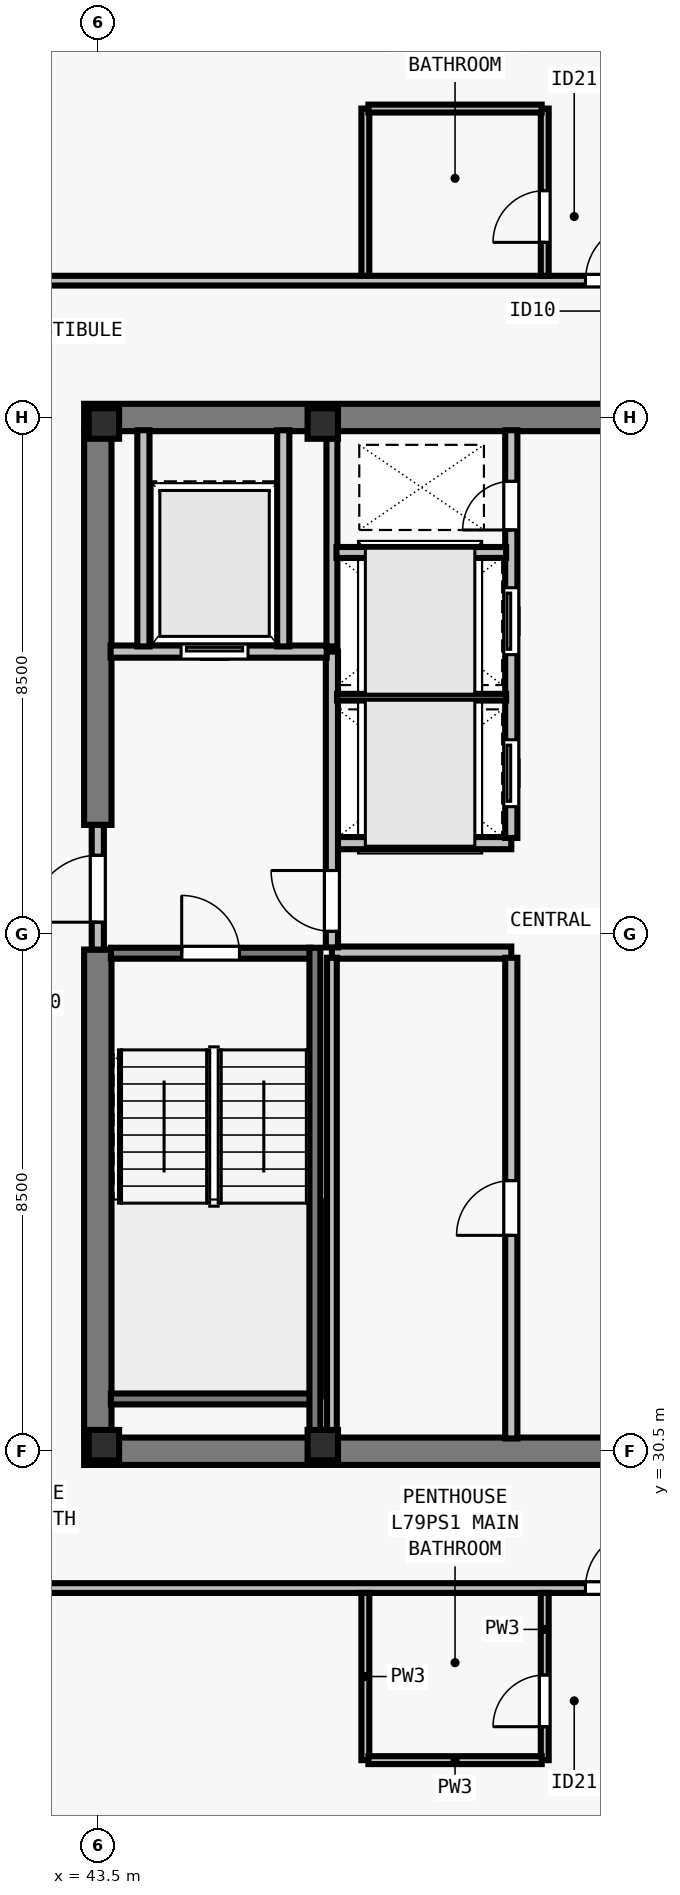
"""IFC4 building model, lengths in metres.
Left out: names, types, materials, properties, quantities, classifications, styles, units other than length and angle.
Written with IfcOpenShell. Run it as: python <this file> out.ifc"""

import sys

from ifc_helpers import new_model, si_unit, direction, frame, frame_2d, origin, origin_2d, place, context, subcontext, project, spatial, rectangle, i_section, extrude, element, fill, save


model = new_model("IFC4")
c1 = context("Model", 3, precision=1e-05, world=origin(), true_north=direction((0.0, 1.0)))
c2 = subcontext(c1, "Body", "Model", "MODEL_VIEW")
j1 = project(units=[si_unit("LENGTHUNIT", "METRE"), si_unit("PLANEANGLEUNIT", "RADIAN")], contexts=[c1])
p1 = place(None, origin())
s1 = spatial("IfcSite", under=j1, at=p1, CompositionType="ELEMENT")
p2 = place(p1, origin())
s2 = spatial("IfcBuilding", under=s1, at=p2, CompositionType="ELEMENT")
p3 = place(p2, frame((0.0, 0.0, 287.5)))
s3 = spatial("IfcBuildingStorey", under=s2, at=p3, CompositionType="ELEMENT", Elevation=287.5)
for number, where, z_axis, x_axis in (
    (1, (43.6, 30.6, 0.0), (0.0, 0.0, 1.0), (1.0, 0.0, 0.0)),
    (2, (47.2, 30.6, 0.0), (0.0, 0.0, 1.0), (1.0, 0.0, 0.0)),
    (3, (43.6, 47.4, 0.0), (0.0, 0.0, 1.0), (1.0, 0.0, 0.0)),
    (4, (47.2, 47.4, 0.0), (0.0, 0.0, 1.0), (1.0, 0.0, 0.0)),
):
    element("IfcColumn", number, at=place(p3, frame(where, z_axis=z_axis, x_axis=x_axis)), inside=s3, PredefinedType="COLUMN", context=c2, shape_type="SweptSolid", body=[
        extrude(i_section(OverallWidth=0.5, OverallDepth=0.5, WebThickness=0.028, FlangeThickness=0.045, at=origin_2d()), origin(), (0.0, 0.0, 1.0), 3.5),
    ])
for number, where, z_axis, x_axis in (
    (5, (43.275, 30.5, 0.0), (0.0, 0.0, 1.0), (1.0, 0.0, 0.0)),
    (6, (43.275, 47.5, 0.0), (0.0, 0.0, 1.0), (1.0, 0.0, 0.0)),
):
    element("IfcWall", number, at=place(p3, frame(where, z_axis=z_axis, x_axis=x_axis)), inside=s3, PredefinedType="SHEAR", context=c2, shape_type="SweptSolid", body=[
        extrude(rectangle(XDim=17.45, YDim=0.45, at=frame_2d((8.725, 0.0))), origin(), (0.0, 0.0, 1.0), 3.29),
    ])
p4 = place(p3, frame((43.5, 30.715, 0.0), z_axis=(0.0, 0.0, 1.0), x_axis=(0.0, 1.0, 0.0)))
e7 = element("IfcWall", 7, at=p4, inside=s3, PredefinedType="SHEAR", context=c2, shape_type="SweptSolid", body=[
    extrude(rectangle(XDim=8.035, YDim=0.45, at=frame_2d((4.018, 0.0))), origin(), (0.0, 0.0, 1.0), 3.29),
])
p5 = place(p3, frame((43.5, 40.8, 0.0), z_axis=(0.0, 0.0, 1.0), x_axis=(0.0, 1.0, 0.0)))
e8 = element("IfcWall", 8, at=p5, inside=s3, PredefinedType="SHEAR", context=c2, shape_type="SweptSolid", body=[
    extrude(rectangle(XDim=6.485, YDim=0.45, at=frame_2d((3.242, 0.0))), origin(), (0.0, 0.0, 1.0), 3.29),
])
for number, where, z_axis, x_axis in (
    (9, (47.35, 38.7, 0.0), (0.0, 0.0, 1.0), (1.0, 0.0, 0.0)),
    (10, (47.35, 40.5, 0.0), (0.0, 0.0, 1.0), (1.0, 0.0, 0.0)),
):
    element("IfcWall", number, at=place(p3, frame(where, z_axis=z_axis, x_axis=x_axis)), inside=s3, PredefinedType="SOLIDWALL", context=c2, shape_type="SweptSolid", body=[
        extrude(rectangle(XDim=2.95, YDim=0.2, at=frame_2d((1.475, 0.0))), origin(), (0.0, 0.0, 1.0), 3.29),
    ])
p6 = place(p3, frame((50.3, 30.71, 0.0), z_axis=(0.0, 0.0, 1.0), x_axis=(0.0, 1.0, 0.0)))
e11 = element("IfcWall", 11, at=p6, inside=s3, PredefinedType="SOLIDWALL", context=c2, shape_type="SweptSolid", body=[
    extrude(rectangle(XDim=7.905, YDim=0.2, at=frame_2d((3.953, 0.0))), origin(), (0.0, 0.0, 1.0), 3.29),
])
p7 = place(p6, frame((3.34, 0.0, 0.0)))
e12 = element("IfcOpeningElement", 12, at=p7, cuts=e11, PredefinedType="OPENING", context=c2, shape_type="SweptSolid", body=[
    extrude(rectangle(XDim=0.9, YDim=2.12, at=frame_2d((0.45, 1.06))), frame((0.0, 0.11, 0.0), z_axis=(0.0, -1.0, 0.0), x_axis=(1.0, 0.0, 0.0)), (0.0, 0.0, 1.0), 0.22),
])
p8 = place(p3, frame((50.3, 40.585, 0.0), z_axis=(0.0, 0.0, 1.0), x_axis=(0.0, 1.0, 0.0)))
e13 = element("IfcWall", 13, at=p8, inside=s3, PredefinedType="SOLIDWALL", context=c2, shape_type="SweptSolid", body=[
    extrude(rectangle(XDim=6.705, YDim=0.2, at=frame_2d((3.353, 0.0))), origin(), (0.0, 0.0, 1.0), 3.29),
])
p9 = place(p8, frame((0.515, 0.0, 0.0)))
e14 = element("IfcOpeningElement", 14, at=p9, cuts=e13, PredefinedType="OPENING", context=c2, shape_type="SweptSolid", body=[
    extrude(rectangle(XDim=1.1, YDim=2.2, at=frame_2d((0.55, 1.1))), frame((0.0, 0.11, 0.0), z_axis=(0.0, -1.0, 0.0), x_axis=(1.0, 0.0, 0.0)), (0.0, 0.0, 1.0), 0.22),
])
p10 = place(p8, frame((3.015, 0.0, 0.0)))
e15 = element("IfcOpeningElement", 15, at=p10, cuts=e13, PredefinedType="OPENING", context=c2, shape_type="SweptSolid", body=[
    extrude(rectangle(XDim=1.1, YDim=2.2, at=frame_2d((0.55, 1.1))), frame((0.0, 0.11, 0.0), z_axis=(0.0, -1.0, 0.0), x_axis=(1.0, 0.0, 0.0)), (0.0, 0.0, 1.0), 0.22),
])
p11 = place(p8, frame((5.065, 0.0, 0.0)))
e16 = element("IfcOpeningElement", 16, at=p11, cuts=e13, PredefinedType="OPENING", context=c2, shape_type="SweptSolid", body=[
    extrude(rectangle(XDim=0.8, YDim=2.08, at=frame_2d((0.4, 1.04))), frame((0.0, 0.11, 0.0), z_axis=(0.0, -1.0, 0.0), x_axis=(1.0, 0.0, 0.0)), (0.0, 0.0, 1.0), 0.22),
])
p12 = place(p3, frame((43.5, 38.75, 0.0), z_axis=(0.0, 0.0, 1.0), x_axis=(0.0, 1.0, 0.0)))
e17 = element("IfcWall", 17, at=p12, inside=s3, PredefinedType="SOLIDWALL", context=c2, shape_type="SweptSolid", body=[
    extrude(rectangle(XDim=2.05, YDim=0.2, at=frame_2d((1.025, 0.0))), origin(), (0.0, 0.0, 1.0), 3.29),
])
p13 = place(p12, frame((0.45, 0.0, 0.0)))
e18 = element("IfcOpeningElement", 18, at=p13, cuts=e17, PredefinedType="OPENING", context=c2, shape_type="SweptSolid", body=[
    extrude(rectangle(XDim=1.1, YDim=2.15, at=frame_2d((0.55, 1.075))), frame((0.0, 0.11, 0.0), z_axis=(0.0, -1.0, 0.0), x_axis=(1.0, 0.0, 0.0)), (0.0, 0.0, 1.0), 0.22),
])
p14 = place(p3, frame((47.35, 38.785, 0.0), z_axis=(0.0, 0.0, 1.0), x_axis=(0.0, 1.0, 0.0)))
e19 = element("IfcWall", 19, at=p14, inside=s3, PredefinedType="SOLIDWALL", context=c2, shape_type="SweptSolid", body=[
    extrude(rectangle(XDim=4.865, YDim=0.2, at=frame_2d((2.433, 0.0))), origin(), (0.0, 0.0, 1.0), 3.29),
])
p15 = place(p14, frame((0.265, 0.0, 0.0)))
e20 = element("IfcOpeningElement", 20, at=p15, cuts=e19, PredefinedType="OPENING", context=c2, shape_type="SweptSolid", body=[
    extrude(rectangle(XDim=1.0, YDim=2.15, at=frame_2d((0.5, 1.075))), frame((0.0, 0.11, 0.0), z_axis=(0.0, -1.0, 0.0), x_axis=(1.0, 0.0, 0.0)), (0.0, 0.0, 1.0), 0.22),
])
p16 = place(p3, frame((43.71, 43.65, 0.0), z_axis=(0.0, 0.0, 1.0), x_axis=(1.0, 0.0, 0.0)))
e21 = element("IfcWall", 21, at=p16, inside=s3, PredefinedType="SOLIDWALL", context=c2, shape_type="SweptSolid", body=[
    extrude(rectangle(XDim=3.555, YDim=0.2, at=frame_2d((1.777, 0.0))), origin(), (0.0, 0.0, 1.0), 3.29),
])
p17 = place(p16, frame((1.16, 0.0, 0.0)))
e22 = element("IfcOpeningElement", 22, at=p17, cuts=e21, PredefinedType="OPENING", context=c2, shape_type="SweptSolid", body=[
    extrude(rectangle(XDim=1.1, YDim=2.2, at=frame_2d((0.55, 1.1))), frame((0.0, 0.11, 0.0), z_axis=(0.0, -1.0, 0.0), x_axis=(1.0, 0.0, 0.0)), (0.0, 0.0, 1.0), 0.22),
])
for number, where, z_axis, x_axis in (
    (23, (46.55, 43.735, 0.0), (0.0, 0.0, 1.0), (0.0, 1.0, 0.0)),
    (24, (44.25, 43.735, 0.0), (0.0, 0.0, 1.0), (0.0, 1.0, 0.0)),
):
    element("IfcWall", number, at=place(p3, frame(where, z_axis=z_axis, x_axis=x_axis)), inside=s3, PredefinedType="SOLIDWALL", context=c2, shape_type="SweptSolid", body=[
        extrude(rectangle(XDim=3.555, YDim=0.2, at=frame_2d((1.777, 0.0))), origin(), (0.0, 0.0, 1.0), 3.29),
    ])
p18 = place(p3, frame((47.35, 30.71, 0.0), z_axis=(0.0, 0.0, 1.0), x_axis=(0.0, 1.0, 0.0)))
e25 = element("IfcWall", 25, at=p18, inside=s3, PredefinedType="PARTITIONING", context=c2, shape_type="SweptSolid", body=[
    extrude(rectangle(XDim=7.905, YDim=0.16, at=frame_2d((3.953, 0.0))), origin(), (0.0, 0.0, 1.0), 3.29),
])
p19 = place(p3, frame((47.35, 43.735, 0.0), z_axis=(0.0, 0.0, 1.0), x_axis=(0.0, 1.0, 0.0)))
e26 = element("IfcWall", 26, at=p19, inside=s3, PredefinedType="SOLIDWALL", context=c2, shape_type="SweptSolid", body=[
    extrude(rectangle(XDim=3.555, YDim=0.18, at=frame_2d((1.777, 0.0))), origin(), (0.0, 0.0, 1.0), 3.29),
])
p20 = place(p3, frame((47.435, 42.9, 0.0), z_axis=(0.0, 0.0, 1.0), x_axis=(1.0, 0.0, 0.0)))
e27 = element("IfcWall", 27, at=p20, inside=s3, PredefinedType="PARTITIONING", context=c2, shape_type="SweptSolid", body=[
    extrude(rectangle(XDim=2.78, YDim=0.11, at=frame_2d((1.39, 0.0))), origin(), (0.0, 0.0, 1.0), 3.29),
])
p21 = place(p3, frame((47.425, 45.28, 0.0), z_axis=(0.0, 0.0, 1.0), x_axis=(1.0, 0.0, 0.0)))
e28 = element("IfcWall", 28, at=p21, inside=s3, PredefinedType="SOLIDWALL", context=c2, shape_type="SweptSolid", body=[
    extrude(rectangle(XDim=2.79, YDim=0.18, at=frame_2d((1.395, 0.0))), origin(), (0.0, 0.0, 1.0), 3.29),
])
p22 = place(p3, frame((31.285, 28.25, 0.0), z_axis=(0.0, 0.0, 1.0), x_axis=(1.0, 0.0, 0.0)))
e29 = element("IfcWall", 29, at=p22, inside=s3, PredefinedType="PARTITIONING", context=c2, shape_type="SweptSolid", body=[
    extrude(rectangle(XDim=41.43, YDim=0.16, at=frame_2d((20.715, 0.0))), origin(), (0.0, 0.0, 1.0), 3.009),
])
p23 = place(p22, frame((20.235, 0.0, 0.0)))
e30 = element("IfcOpeningElement", 30, at=p23, cuts=e29, PredefinedType="OPENING", context=c2, shape_type="SweptSolid", body=[
    extrude(rectangle(XDim=0.96, YDim=2.18, at=frame_2d((0.48, 1.09))), frame((0.0, 0.09, 0.0), z_axis=(0.0, -1.0, 0.0), x_axis=(1.0, 0.0, 0.0)), (0.0, 0.0, 1.0), 0.18),
])
p24 = place(p3, frame((31.285, 49.75, 0.0), z_axis=(0.0, 0.0, 1.0), x_axis=(1.0, 0.0, 0.0)))
e31 = element("IfcWall", 31, at=p24, inside=s3, PredefinedType="PARTITIONING", context=c2, shape_type="SweptSolid", body=[
    extrude(rectangle(XDim=41.43, YDim=0.16, at=frame_2d((20.715, 0.0))), origin(), (0.0, 0.0, 1.0), 3.009),
])
p25 = place(p24, frame((20.235, 0.0, 0.0)))
e32 = element("IfcOpeningElement", 32, at=p25, cuts=e31, PredefinedType="OPENING", context=c2, shape_type="SweptSolid", body=[
    extrude(rectangle(XDim=0.96, YDim=2.18, at=frame_2d((0.48, 1.09))), frame((0.0, 0.09, 0.0), z_axis=(0.0, -1.0, 0.0), x_axis=(1.0, 0.0, 0.0)), (0.0, 0.0, 1.0), 0.18),
])
p26 = place(p3, frame((47.9, 25.42, 0.0), z_axis=(0.0, 0.0, 1.0), x_axis=(0.0, 1.0, 0.0)))
e33 = element("IfcWall", 33, at=p26, inside=s3, PredefinedType="PLUMBINGWALL", context=c2, shape_type="SweptSolid", body=[
    extrude(rectangle(XDim=2.75, YDim=0.13, at=frame_2d((1.375, 0.0))), origin(), (0.0, 0.0, 1.0), 3.29),
])
p27 = place(p3, frame((50.85, 25.42, 0.0), z_axis=(0.0, 0.0, 1.0), x_axis=(0.0, 1.0, 0.0)))
e34 = element("IfcWall", 34, at=p27, inside=s3, PredefinedType="PLUMBINGWALL", context=c2, shape_type="SweptSolid", body=[
    extrude(rectangle(XDim=2.75, YDim=0.13, at=frame_2d((1.375, 0.0))), origin(), (0.0, 0.0, 1.0), 3.29),
])
p28 = place(p27, frame((0.55, 0.0, 0.0)))
e35 = element("IfcOpeningElement", 35, at=p28, cuts=e34, PredefinedType="OPENING", context=c2, shape_type="SweptSolid", body=[
    extrude(rectangle(XDim=0.85, YDim=2.08, at=frame_2d((0.425, 1.04))), frame((0.0, 0.075, 0.0), z_axis=(0.0, -1.0, 0.0), x_axis=(1.0, 0.0, 0.0)), (0.0, 0.0, 1.0), 0.15),
])
p29 = place(p3, frame((47.95, 25.42, 0.0), z_axis=(0.0, 0.0, 1.0), x_axis=(1.0, 0.0, 0.0)))
e36 = element("IfcWall", 36, at=p29, inside=s3, PredefinedType="PLUMBINGWALL", context=c2, shape_type="SweptSolid", body=[
    extrude(rectangle(XDim=2.85, YDim=0.13, at=frame_2d((1.425, 0.0))), origin(), (0.0, 0.0, 1.0), 3.29),
])
p30 = place(p3, frame((47.9, 49.83, 0.0), z_axis=(0.0, 0.0, 1.0), x_axis=(0.0, 1.0, 0.0)))
e37 = element("IfcWall", 37, at=p30, inside=s3, PredefinedType="PLUMBINGWALL", context=c2, shape_type="SweptSolid", body=[
    extrude(rectangle(XDim=2.75, YDim=0.13, at=frame_2d((1.375, 0.0))), origin(), (0.0, 0.0, 1.0), 3.29),
])
p31 = place(p3, frame((50.85, 49.83, 0.0), z_axis=(0.0, 0.0, 1.0), x_axis=(0.0, 1.0, 0.0)))
e38 = element("IfcWall", 38, at=p31, inside=s3, PredefinedType="PLUMBINGWALL", context=c2, shape_type="SweptSolid", body=[
    extrude(rectangle(XDim=2.75, YDim=0.13, at=frame_2d((1.375, 0.0))), origin(), (0.0, 0.0, 1.0), 3.009),
])
p32 = place(p31, frame((0.55, 0.0, 0.0)))
e39 = element("IfcOpeningElement", 39, at=p32, cuts=e38, PredefinedType="OPENING", context=c2, shape_type="SweptSolid", body=[
    extrude(rectangle(XDim=0.85, YDim=2.08, at=frame_2d((0.425, 1.04))), frame((0.0, 0.075, 0.0), z_axis=(0.0, -1.0, 0.0), x_axis=(1.0, 0.0, 0.0)), (0.0, 0.0, 1.0), 0.15),
])
p33 = place(p3, frame((47.95, 52.58, 0.0), z_axis=(0.0, 0.0, 1.0), x_axis=(1.0, 0.0, 0.0)))
e40 = element("IfcWall", 40, at=p33, inside=s3, PredefinedType="PLUMBINGWALL", context=c2, shape_type="SweptSolid", body=[
    extrude(rectangle(XDim=2.85, YDim=0.13, at=frame_2d((1.425, 0.0))), origin(), (0.0, 0.0, 1.0), 3.29),
])
p34 = place(p3, frame((43.715, 38.69, 0.0), z_axis=(0.0, 0.0, 1.0), x_axis=(1.0, 0.0, 0.0)))
e41 = element("IfcWall", 41, at=p34, inside=s3, PredefinedType="SOLIDWALL", context=c2, shape_type="SweptSolid", body=[
    extrude(rectangle(XDim=3.28, YDim=0.18, at=frame_2d((1.64, 0.0))), origin(), (0.0, 0.0, 1.0), 3.29),
])
p35 = place(p34, frame((1.165, 0.0, 0.0)))
e42 = element("IfcOpeningElement", 42, at=p35, cuts=e41, PredefinedType="OPENING", context=c2, shape_type="SweptSolid", body=[
    extrude(rectangle(XDim=0.95, YDim=2.15, at=frame_2d((0.475, 1.075))), frame((0.0, 0.1, 0.0), z_axis=(0.0, -1.0, 0.0), x_axis=(1.0, 0.0, 0.0)), (0.0, 0.0, 1.0), 0.2),
])
p36 = place(p3, frame((43.715, 31.36, 0.0), z_axis=(0.0, 0.0, 1.0), x_axis=(1.0, 0.0, 0.0)))
e43 = element("IfcWall", 43, at=p36, inside=s3, PredefinedType="SOLIDWALL", context=c2, shape_type="SweptSolid", body=[
    extrude(rectangle(XDim=3.28, YDim=0.18, at=frame_2d((1.64, 0.0))), origin(), (0.0, 0.0, 1.0), 3.29),
])
p37 = place(p3, frame((47.07, 38.78, 0.0), z_axis=(0.0, 0.0, 1.0), x_axis=(0.0, -1.0, 0.0)))
e44 = element("IfcWall", 44, at=p37, inside=s3, PredefinedType="SOLIDWALL", context=c2, shape_type="SweptSolid", body=[
    extrude(rectangle(XDim=8.067, YDim=0.18, at=frame_2d((4.034, 0.0))), origin(), (0.0, 0.0, 1.0), 3.29),
])
p38 = place(p13, origin())
e45 = element("IfcDoor", 45, at=p38, inside=s3, OperationType="SINGLE_SWING_LEFT", PredefinedType="DOOR", context=c2, shape_type="SweptSolid", body=[
    extrude(rectangle(XDim=1.1, YDim=2.15, at=frame_2d((0.55, 1.075))), frame((0.0, 0.025, 0.0), z_axis=(0.0, -1.0, 0.0), x_axis=(1.0, 0.0, 0.0)), (0.0, 0.0, 1.0), 0.05),
])
fill(e18, e45)
p39 = place(p15, origin())
e46 = element("IfcDoor", 46, at=p39, inside=s3, OperationType="SINGLE_SWING_RIGHT", PredefinedType="DOOR", context=c2, shape_type="SweptSolid", body=[
    extrude(rectangle(XDim=1.0, YDim=2.15, at=frame_2d((0.5, 1.075))), frame((0.0, 0.025, 0.0), z_axis=(0.0, -1.0, 0.0), x_axis=(1.0, 0.0, 0.0)), (0.0, 0.0, 1.0), 0.05),
])
fill(e20, e46)
p40 = place(p17, origin())
e47 = element("IfcDoor", 47, at=p40, inside=s3, OperationType="SLIDING_TO_LEFT", PredefinedType="DOOR", context=c2, shape_type="SweptSolid", body=[
    extrude(rectangle(XDim=1.1, YDim=2.2, at=frame_2d((0.55, 1.1))), frame((0.0, 0.025, 0.0), z_axis=(0.0, -1.0, 0.0), x_axis=(1.0, 0.0, 0.0)), (0.0, 0.0, 1.0), 0.05),
])
fill(e22, e47)
p41 = place(p7, origin())
e48 = element("IfcDoor", 48, at=p41, inside=s3, OperationType="SINGLE_SWING_LEFT", PredefinedType="DOOR", context=c2, shape_type="SweptSolid", body=[
    extrude(rectangle(XDim=0.9, YDim=2.12, at=frame_2d((0.45, 1.06))), frame((0.0, 0.025, 0.0), z_axis=(0.0, -1.0, 0.0), x_axis=(1.0, 0.0, 0.0)), (0.0, 0.0, 1.0), 0.05),
])
fill(e12, e48)
p42 = place(p9, origin())
e49 = element("IfcDoor", 49, at=p42, inside=s3, OperationType="SLIDING_TO_LEFT", PredefinedType="DOOR", context=c2, shape_type="SweptSolid", body=[
    extrude(rectangle(XDim=1.1, YDim=2.2, at=frame_2d((0.55, 1.1))), frame((0.0, 0.025, 0.0), z_axis=(0.0, -1.0, 0.0), x_axis=(1.0, 0.0, 0.0)), (0.0, 0.0, 1.0), 0.05),
])
fill(e14, e49)
p43 = place(p10, origin())
e50 = element("IfcDoor", 50, at=p43, inside=s3, OperationType="SLIDING_TO_LEFT", PredefinedType="DOOR", context=c2, shape_type="SweptSolid", body=[
    extrude(rectangle(XDim=1.1, YDim=2.2, at=frame_2d((0.55, 1.1))), frame((0.0, 0.025, 0.0), z_axis=(0.0, -1.0, 0.0), x_axis=(1.0, 0.0, 0.0)), (0.0, 0.0, 1.0), 0.05),
])
fill(e15, e50)
p44 = place(p11, origin())
e51 = element("IfcDoor", 51, at=p44, inside=s3, OperationType="SINGLE_SWING_LEFT", PredefinedType="DOOR", context=c2, shape_type="SweptSolid", body=[
    extrude(rectangle(XDim=0.8, YDim=2.08, at=frame_2d((0.4, 1.04))), frame((0.0, 0.025, 0.0), z_axis=(0.0, -1.0, 0.0), x_axis=(1.0, 0.0, 0.0)), (0.0, 0.0, 1.0), 0.05),
])
fill(e16, e51)
p45 = place(p28, origin())
e52 = element("IfcDoor", 52, at=p45, inside=s3, OperationType="SINGLE_SWING_LEFT", PredefinedType="DOOR", context=c2, shape_type="SweptSolid", body=[
    extrude(rectangle(XDim=0.85, YDim=2.08, at=frame_2d((0.425, 1.04))), frame((0.0, 0.025, 0.0), z_axis=(0.0, -1.0, 0.0), x_axis=(1.0, 0.0, 0.0)), (0.0, 0.0, 1.0), 0.05),
])
fill(e35, e52)
p46 = place(p23, origin())
e53 = element("IfcDoor", 53, at=p46, inside=s3, OperationType="SINGLE_SWING_RIGHT", PredefinedType="DOOR", context=c2, shape_type="SweptSolid", body=[
    extrude(rectangle(XDim=0.96, YDim=2.18, at=frame_2d((0.48, 1.09))), frame((0.0, 0.025, 0.0), z_axis=(0.0, -1.0, 0.0), x_axis=(1.0, 0.0, 0.0)), (0.0, 0.0, 1.0), 0.05),
])
fill(e30, e53)
p47 = place(p32, origin())
e54 = element("IfcDoor", 54, at=p47, inside=s3, OperationType="SINGLE_SWING_LEFT", PredefinedType="DOOR", context=c2, shape_type="SweptSolid", body=[
    extrude(rectangle(XDim=0.85, YDim=2.08, at=frame_2d((0.425, 1.04))), frame((0.0, 0.025, 0.0), z_axis=(0.0, -1.0, 0.0), x_axis=(1.0, 0.0, 0.0)), (0.0, 0.0, 1.0), 0.05),
])
fill(e39, e54)
p48 = place(p25, origin())
e55 = element("IfcDoor", 55, at=p48, inside=s3, OperationType="SINGLE_SWING_RIGHT", PredefinedType="DOOR", context=c2, shape_type="SweptSolid", body=[
    extrude(rectangle(XDim=0.96, YDim=2.18, at=frame_2d((0.48, 1.09))), frame((0.0, 0.025, 0.0), z_axis=(0.0, -1.0, 0.0), x_axis=(1.0, 0.0, 0.0)), (0.0, 0.0, 1.0), 0.05),
])
fill(e32, e55)
p49 = place(p35, origin())
e56 = element("IfcDoor", 56, at=p49, inside=s3, OperationType="SINGLE_SWING_LEFT", PredefinedType="DOOR", context=c2, shape_type="SweptSolid", body=[
    extrude(rectangle(XDim=0.95, YDim=2.15, at=frame_2d((0.475, 1.075))), frame((0.0, 0.025, 0.0), z_axis=(0.0, -1.0, 0.0), x_axis=(1.0, 0.0, 0.0)), (0.0, 0.0, 1.0), 0.05),
])
fill(e42, e56)
save(model, sys.argv[1])
